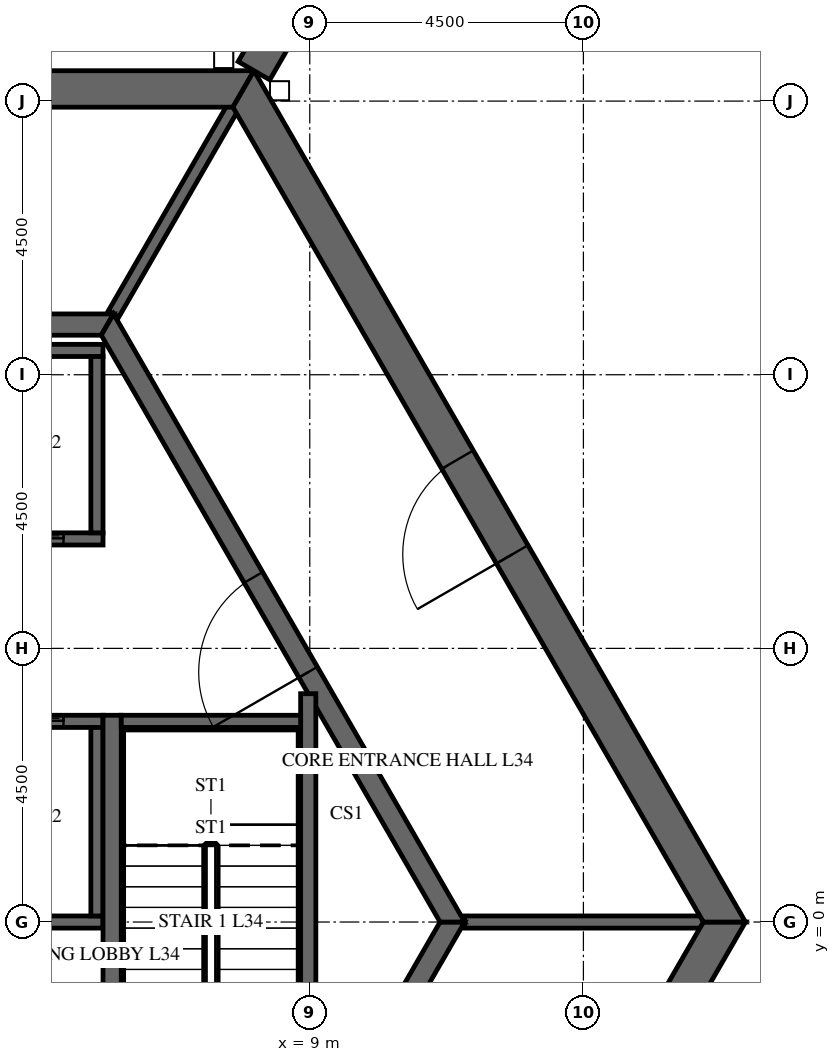
"""IFC4 building model, lengths in metres.
Left out: names, types, materials, properties, quantities, classifications, styles, units other than length and angle.
Written with IfcOpenShell. Run it as: python <this file> out.ifc"""

import sys

from ifc_helpers import new_model, si_unit, direction, frame, frame_2d, origin, place, context, subcontext, project, spatial, polyline, rectangle, outline, extrude, element, fill, save


model = new_model("IFC4")
c1 = context("Model", 3, precision=1e-05, world=origin(), true_north=direction((0.0, 1.0)))
c2 = subcontext(c1, "Body", "Model", "MODEL_VIEW")
j1 = project(units=[si_unit("LENGTHUNIT", "METRE"), si_unit("PLANEANGLEUNIT", "RADIAN")], contexts=[c1])
p1 = place(None, origin())
s1 = spatial("IfcSite", under=j1, at=p1, CompositionType="ELEMENT")
p2 = place(p1, origin())
s2 = spatial("IfcBuilding", under=s1, at=p2, CompositionType="ELEMENT")
p3 = place(p2, frame((0.0, 0.0, 146.7)))
s3 = spatial("IfcBuildingStorey", under=s2, at=p3, CompositionType="ELEMENT", Elevation=146.7)
p4 = place(p3, frame((7.91, -13.7, -0.3), z_axis=(0.0, 0.0, 1.0), x_axis=(0.499999880136, 0.866025472988, 0.0)))
e1 = element("IfcWall", 1, at=p4, inside=s3, PredefinedType="SHEAR", context=c2, shape_type="SweptSolid", body=[
    extrude(outline(polyline([(-0.173, -0.3), (15.993, -0.3), (15.646, 0.3), (0.173, 0.3), (-0.173, -0.3)])), origin(), (0.0, 0.0, 1.0), 5.8),
])
p5 = place(p4, frame((7.039, 0.0, 0.3)))
e2 = element("IfcOpeningElement", 2, at=p5, cuts=e1, PredefinedType="OPENING", context=c2, shape_type="SweptSolid", body=[
    extrude(rectangle(XDim=1.8, YDim=2.4, at=frame_2d((0.9, 1.2))), frame((0.0, 0.31, 0.0), z_axis=(0.0, -1.0, 0.0), x_axis=(1.0, 0.0, 0.0)), (0.0, 0.0, 1.0), 0.62),
])
p6 = place(p3, frame((15.819, 0.0, -0.3), z_axis=(0.0, 0.0, 1.0), x_axis=(-0.499999880136, 0.866025472988, 0.0)))
e3 = element("IfcWall", 3, at=p6, inside=s3, PredefinedType="SHEAR", context=c2, shape_type="SweptSolid", body=[
    extrude(outline(polyline([(-0.173, -0.3), (15.993, -0.3), (15.646, 0.3), (0.173, 0.3), (-0.173, -0.3)])), origin(), (0.0, 0.0, 1.0), 5.8),
])
p7 = place(p6, frame((6.981, 0.0, 0.3)))
e4 = element("IfcOpeningElement", 4, at=p7, cuts=e3, PredefinedType="OPENING", context=c2, shape_type="SweptSolid", body=[
    extrude(rectangle(XDim=1.8, YDim=2.4, at=frame_2d((0.9, 1.2))), frame((0.0, 0.31, 0.0), z_axis=(0.0, -1.0, 0.0), x_axis=(1.0, 0.0, 0.0)), (0.0, 0.0, 1.0), 0.62),
])
p8 = place(p3, frame((7.91, 13.7, -0.3), z_axis=(0.0, 0.0, 1.0), x_axis=(-1.0, 0.0, 0.0)))
e5 = element("IfcWall", 5, at=p8, inside=s3, PredefinedType="SHEAR", context=c2, shape_type="SweptSolid", body=[
    extrude(outline(polyline([(-0.173, -0.3), (15.993, -0.3), (15.646, 0.3), (0.173, 0.3), (-0.173, -0.3)])), origin(), (0.0, 0.0, 1.0), 5.8),
])
p9 = place(p8, frame((7.31, 0.0, 0.3)))
e6 = element("IfcOpeningElement", 6, at=p9, cuts=e5, PredefinedType="OPENING", context=c2, shape_type="SweptSolid", body=[
    extrude(rectangle(XDim=1.2, YDim=2.4, at=frame_2d((0.6, 1.2))), frame((0.0, 0.31, 0.0), z_axis=(0.0, -1.0, 0.0), x_axis=(1.0, 0.0, 0.0)), (0.0, 0.0, 1.0), 0.62),
])
p10 = place(p3, frame((8.083, 14.0, -0.3), z_axis=(0.0, 0.0, 1.0), x_axis=(0.499997680643, 0.866026742862, 0.0)))
e7 = element("IfcWall", 7, at=p10, inside=s3, PredefinedType="SHEAR", context=c2, shape_type="SweptSolid", body=[
    extrude(rectangle(XDim=16.509, YDim=0.6, at=frame_2d((8.254, 0.0))), origin(), (0.0, 0.0, 1.0), 5.8),
])
p11 = place(p10, frame((7.354, 0.0, 0.3)))
e8 = element("IfcOpeningElement", 8, at=p11, cuts=e7, PredefinedType="OPENING", context=c2, shape_type="SweptSolid", body=[
    extrude(rectangle(XDim=1.8, YDim=2.4, at=frame_2d((0.9, 1.2))), frame((0.0, 0.31, 0.0), z_axis=(0.0, -1.0, 0.0), x_axis=(1.0, 0.0, 0.0)), (0.0, 0.0, 1.0), 0.62),
])
p12 = place(p3, frame((5.673, -9.825, -0.3), z_axis=(0.0, 0.0, 1.0), x_axis=(0.499995046907, 0.866028263435, 0.0)))
e9 = element("IfcWall", 9, at=p12, inside=s3, PredefinedType="SHEAR", context=c2, shape_type="SweptSolid", body=[
    extrude(outline(polyline([(-0.101, -0.175), (11.446, -0.175), (11.244, 0.175), (0.101, 0.175), (-0.101, -0.175)])), origin(), (0.0, 0.0, 1.0), 5.8),
])
p13 = place(p12, frame((4.801, 0.0, 0.3)))
e10 = element("IfcOpeningElement", 10, at=p13, cuts=e9, PredefinedType="OPENING", context=c2, shape_type="SweptSolid", body=[
    extrude(rectangle(XDim=1.8, YDim=2.4, at=frame_2d((0.9, 1.2))), frame((0.0, 0.185, 0.0), z_axis=(0.0, -1.0, 0.0), x_axis=(1.0, 0.0, 0.0)), (0.0, 0.0, 1.0), 0.37),
])
p14 = place(p3, frame((11.345, 0.0, -0.3), z_axis=(0.0, 0.0, 1.0), x_axis=(-0.499995046907, 0.866028263435, 0.0)))
e11 = element("IfcWall", 11, at=p14, inside=s3, PredefinedType="SHEAR", context=c2, shape_type="SweptSolid", body=[
    extrude(outline(polyline([(-0.101, -0.175), (11.446, -0.175), (11.244, 0.175), (0.101, 0.175), (-0.101, -0.175)])), origin(), (0.0, 0.0, 1.0), 5.8),
])
p15 = place(p14, frame((4.744, 0.0, 0.3)))
e12 = element("IfcOpeningElement", 12, at=p15, cuts=e11, PredefinedType="OPENING", context=c2, shape_type="SweptSolid", body=[
    extrude(rectangle(XDim=1.8, YDim=2.4, at=frame_2d((0.9, 1.2))), frame((0.0, 0.185, 0.0), z_axis=(0.0, -1.0, 0.0), x_axis=(1.0, 0.0, 0.0)), (0.0, 0.0, 1.0), 0.37),
])
p16 = place(p3, frame((5.673, 9.825, -0.3), z_axis=(0.0, 0.0, 1.0), x_axis=(-1.0, 0.0, 0.0)))
e13 = element("IfcWall", 13, at=p16, inside=s3, PredefinedType="SHEAR", context=c2, shape_type="SweptSolid", body=[
    extrude(outline(polyline([(-0.101, -0.175), (11.446, -0.175), (11.244, 0.175), (0.101, 0.175), (-0.101, -0.175)])), origin(), (0.0, 0.0, 1.0), 5.8),
])
p17 = place(p3, frame((-5.6, 6.3, -0.25), z_axis=(0.0, 0.0, 1.0), x_axis=(1.0, 0.0, 0.0)))
e14 = element("IfcWall", 14, at=p17, inside=s3, PredefinedType="SHEAR", context=c2, shape_type="SweptSolid", body=[
    extrude(rectangle(XDim=11.2, YDim=0.2, at=frame_2d((5.6, 0.0))), origin(), (0.0, 0.0, 1.0), 5.75),
])
p18 = place(p17, frame((0.65, 0.0, 0.25)))
e15 = element("IfcOpeningElement", 15, at=p18, cuts=e14, PredefinedType="OPENING", context=c2, shape_type="SweptSolid", body=[
    extrude(rectangle(XDim=1.1, YDim=2.1, at=frame_2d((0.55, 1.05))), frame((0.0, 0.11, 0.0), z_axis=(0.0, -1.0, 0.0), x_axis=(1.0, 0.0, 0.0)), (0.0, 0.0, 1.0), 0.22),
])
p19 = place(p17, frame((2.85, 0.0, 0.25)))
e16 = element("IfcOpeningElement", 16, at=p19, cuts=e14, PredefinedType="OPENING", context=c2, shape_type="SweptSolid", body=[
    extrude(rectangle(XDim=1.1, YDim=2.1, at=frame_2d((0.55, 1.05))), frame((0.0, 0.11, 0.0), z_axis=(0.0, -1.0, 0.0), x_axis=(1.0, 0.0, 0.0)), (0.0, 0.0, 1.0), 0.22),
])
p20 = place(p17, frame((5.05, 0.0, 0.25)))
e17 = element("IfcOpeningElement", 17, at=p20, cuts=e14, PredefinedType="OPENING", context=c2, shape_type="SweptSolid", body=[
    extrude(rectangle(XDim=1.1, YDim=2.1, at=frame_2d((0.55, 1.05))), frame((0.0, 0.11, 0.0), z_axis=(0.0, -1.0, 0.0), x_axis=(1.0, 0.0, 0.0)), (0.0, 0.0, 1.0), 0.22),
])
p21 = place(p17, frame((7.25, 0.0, 0.25)))
e18 = element("IfcOpeningElement", 18, at=p21, cuts=e14, PredefinedType="OPENING", context=c2, shape_type="SweptSolid", body=[
    extrude(rectangle(XDim=1.1, YDim=2.1, at=frame_2d((0.55, 1.05))), frame((0.0, 0.11, 0.0), z_axis=(0.0, -1.0, 0.0), x_axis=(1.0, 0.0, 0.0)), (0.0, 0.0, 1.0), 0.22),
])
p22 = place(p17, frame((9.45, 0.0, 0.25)))
e19 = element("IfcOpeningElement", 19, at=p22, cuts=e14, PredefinedType="OPENING", context=c2, shape_type="SweptSolid", body=[
    extrude(rectangle(XDim=1.1, YDim=2.1, at=frame_2d((0.55, 1.05))), frame((0.0, 0.11, 0.0), z_axis=(0.0, -1.0, 0.0), x_axis=(1.0, 0.0, 0.0)), (0.0, 0.0, 1.0), 0.22),
])
p23 = place(p3, frame((-5.6, 9.4, -0.25), z_axis=(0.0, 0.0, 1.0), x_axis=(1.0, 0.0, 0.0)))
e20 = element("IfcWall", 20, at=p23, inside=s3, PredefinedType="SHEAR", context=c2, shape_type="SweptSolid", body=[
    extrude(rectangle(XDim=11.2, YDim=0.2, at=frame_2d((5.6, 0.0))), origin(), (0.0, 0.0, 1.0), 5.75),
])
p24 = place(p3, frame((5.5, 6.4, -0.25), z_axis=(0.0, 0.0, 1.0), x_axis=(0.0, 1.0, 0.0)))
e21 = element("IfcWall", 21, at=p24, inside=s3, PredefinedType="SHEAR", context=c2, shape_type="SweptSolid", body=[
    extrude(rectangle(XDim=2.9, YDim=0.2, at=frame_2d((1.45, 0.0))), origin(), (0.0, 0.0, 1.0), 5.75),
])
p25 = place(p3, frame((-5.6, 3.3, -0.25), z_axis=(0.0, 0.0, 1.0), x_axis=(1.0, 0.0, 0.0)))
e22 = element("IfcWall", 22, at=p25, inside=s3, PredefinedType="SHEAR", context=c2, shape_type="SweptSolid", body=[
    extrude(rectangle(XDim=11.2, YDim=0.2, at=frame_2d((5.6, 0.0))), origin(), (0.0, 0.0, 1.0), 5.75),
])
p26 = place(p25, frame((0.65, 0.0, 0.25)))
e23 = element("IfcOpeningElement", 23, at=p26, cuts=e22, PredefinedType="OPENING", context=c2, shape_type="SweptSolid", body=[
    extrude(rectangle(XDim=1.1, YDim=2.1, at=frame_2d((0.55, 1.05))), frame((0.0, 0.11, 0.0), z_axis=(0.0, -1.0, 0.0), x_axis=(1.0, 0.0, 0.0)), (0.0, 0.0, 1.0), 0.22),
])
p27 = place(p25, frame((2.85, 0.0, 0.25)))
e24 = element("IfcOpeningElement", 24, at=p27, cuts=e22, PredefinedType="OPENING", context=c2, shape_type="SweptSolid", body=[
    extrude(rectangle(XDim=1.1, YDim=2.1, at=frame_2d((0.55, 1.05))), frame((0.0, 0.11, 0.0), z_axis=(0.0, -1.0, 0.0), x_axis=(1.0, 0.0, 0.0)), (0.0, 0.0, 1.0), 0.22),
])
p28 = place(p25, frame((5.05, 0.0, 0.25)))
e25 = element("IfcOpeningElement", 25, at=p28, cuts=e22, PredefinedType="OPENING", context=c2, shape_type="SweptSolid", body=[
    extrude(rectangle(XDim=1.1, YDim=2.1, at=frame_2d((0.55, 1.05))), frame((0.0, 0.11, 0.0), z_axis=(0.0, -1.0, 0.0), x_axis=(1.0, 0.0, 0.0)), (0.0, 0.0, 1.0), 0.22),
])
p29 = place(p25, frame((7.25, 0.0, 0.25)))
e26 = element("IfcOpeningElement", 26, at=p29, cuts=e22, PredefinedType="OPENING", context=c2, shape_type="SweptSolid", body=[
    extrude(rectangle(XDim=1.1, YDim=2.1, at=frame_2d((0.55, 1.05))), frame((0.0, 0.11, 0.0), z_axis=(0.0, -1.0, 0.0), x_axis=(1.0, 0.0, 0.0)), (0.0, 0.0, 1.0), 0.22),
])
p30 = place(p25, frame((9.45, 0.0, 0.25)))
e27 = element("IfcOpeningElement", 27, at=p30, cuts=e22, PredefinedType="OPENING", context=c2, shape_type="SweptSolid", body=[
    extrude(rectangle(XDim=1.1, YDim=2.1, at=frame_2d((0.55, 1.05))), frame((0.0, 0.11, 0.0), z_axis=(0.0, -1.0, 0.0), x_axis=(1.0, 0.0, 0.0)), (0.0, 0.0, 1.0), 0.22),
])
p31 = place(p3, frame((-5.6, 0.0, -0.25), z_axis=(0.0, 0.0, 1.0), x_axis=(1.0, 0.0, 0.0)))
e28 = element("IfcWall", 28, at=p31, inside=s3, PredefinedType="SHEAR", context=c2, shape_type="SweptSolid", body=[
    extrude(rectangle(XDim=11.2, YDim=0.2, at=frame_2d((5.6, 0.0))), origin(), (0.0, 0.0, 1.0), 5.75),
])
p32 = place(p3, frame((5.5, 0.1, -0.25), z_axis=(0.0, 0.0, 1.0), x_axis=(0.0, 1.0, 0.0)))
e29 = element("IfcWall", 29, at=p32, inside=s3, PredefinedType="SHEAR", context=c2, shape_type="SweptSolid", body=[
    extrude(rectangle(XDim=3.1, YDim=0.2, at=frame_2d((1.55, 0.0))), origin(), (0.0, 0.0, 1.0), 5.75),
])
p33 = place(p3, frame((11.547, 0.0, -0.3), z_axis=(0.0, 0.0, 1.0), x_axis=(1.0, 0.0, 0.0)))
e30 = element("IfcWall", 30, at=p33, inside=s3, PredefinedType="SHEAR", context=c2, shape_type="SweptSolid", body=[
    extrude(rectangle(XDim=3.926, YDim=0.2, at=frame_2d((1.963, 0.0))), origin(), (0.0, 0.0, 1.0), 5.8),
])
p34 = place(p3, frame((5.773, 10.0, -0.3), z_axis=(0.0, 0.0, 1.0), x_axis=(0.500038251005, 0.86600331843, 0.0)))
e31 = element("IfcWall", 31, at=p34, inside=s3, PredefinedType="SHEAR", context=c2, shape_type="SweptSolid", body=[
    extrude(rectangle(XDim=3.926, YDim=0.2, at=frame_2d((1.963, 0.0))), origin(), (0.0, 0.0, 1.0), 5.8),
])
p35 = place(p3, frame((5.75, -3.4, -0.25), z_axis=(0.0, 0.0, 1.0), x_axis=(0.0, 1.0, 0.0)))
e32 = element("IfcWall", 32, at=p35, inside=s3, PredefinedType="SHEAR", context=c2, shape_type="SweptSolid", body=[
    extrude(rectangle(XDim=6.8, YDim=0.3, at=frame_2d((3.4, 0.0))), origin(), (0.0, 0.0, 1.0), 5.75),
])
p36 = place(p3, frame((8.975, -3.755, -0.25), z_axis=(0.0, 0.0, 1.0), x_axis=(0.0, 1.0, 0.0)))
e33 = element("IfcWall", 33, at=p36, inside=s3, PredefinedType="SHEAR", context=c2, shape_type="SweptSolid", body=[
    extrude(rectangle(XDim=7.51, YDim=0.25, at=frame_2d((3.755, 0.0))), origin(), (0.0, 0.0, 1.0), 5.75),
])
p37 = place(p3, frame((5.9, 3.3, -0.25), z_axis=(0.0, 0.0, 1.0), x_axis=(1.0, 0.0, 0.0)))
e34 = element("IfcWall", 34, at=p37, inside=s3, PredefinedType="SHEAR", context=c2, shape_type="SweptSolid", body=[
    extrude(rectangle(XDim=2.95, YDim=0.2, at=frame_2d((1.475, 0.0))), origin(), (0.0, 0.0, 1.0), 5.75),
])
p38 = place(p3, frame((26.523, 0.1, 0.0), z_axis=(0.0, 0.0, 1.0), x_axis=(-0.499985419657, 0.866033821586, 0.0)))
e35 = element("IfcWall", 35, at=p38, inside=s3, PredefinedType="PARTITIONING", context=c2, shape_type="SweptSolid", body=[
    extrude(rectangle(XDim=26.119, YDim=0.2, at=frame_2d((13.06, 0.0))), origin(), (0.0, 0.0, 1.0), 4.573),
])
p39 = place(p38, frame((12.459, 0.0, 0.0)))
e36 = element("IfcOpeningElement", 36, at=p39, cuts=e35, PredefinedType="OPENING", context=c2, shape_type="SweptSolid", body=[
    extrude(rectangle(XDim=1.2, YDim=2.1, at=frame_2d((0.6, 1.05))), frame((0.0, 0.11, 0.0), z_axis=(0.0, -1.0, 0.0), x_axis=(1.0, 0.0, 0.0)), (0.0, 0.0, 1.0), 0.22),
])
p40 = place(p7, origin())
e37 = element("IfcDoor", 37, at=p40, inside=s3, OperationType="DOUBLE_DOOR_SINGLE_SWING", PredefinedType="DOOR", context=c2, shape_type="SweptSolid", body=[
    extrude(rectangle(XDim=1.8, YDim=2.4, at=frame_2d((0.9, 1.2))), frame((0.0, 0.025, 0.0), z_axis=(0.0, -1.0, 0.0), x_axis=(1.0, 0.0, 0.0)), (0.0, 0.0, 1.0), 0.05),
])
fill(e4, e37)
p41 = place(p15, origin())
e38 = element("IfcDoor", 38, at=p41, inside=s3, OperationType="DOUBLE_DOOR_SINGLE_SWING", PredefinedType="DOOR", context=c2, shape_type="SweptSolid", body=[
    extrude(rectangle(XDim=1.8, YDim=2.4, at=frame_2d((0.9, 1.2))), frame((0.0, 0.025, 0.0), z_axis=(0.0, -1.0, 0.0), x_axis=(1.0, 0.0, 0.0)), (0.0, 0.0, 1.0), 0.05),
])
fill(e12, e38)
p42 = place(p22, origin())
e39 = element("IfcDoor", 39, at=p42, inside=s3, OperationType="SLIDING_TO_LEFT", PredefinedType="DOOR", context=c2, shape_type="SweptSolid", body=[
    extrude(rectangle(XDim=1.1, YDim=2.1, at=frame_2d((0.55, 1.05))), frame((0.0, 0.025, 0.0), z_axis=(0.0, -1.0, 0.0), x_axis=(1.0, 0.0, 0.0)), (0.0, 0.0, 1.0), 0.05),
])
fill(e19, e39)
p43 = place(p30, origin())
e40 = element("IfcDoor", 40, at=p43, inside=s3, OperationType="SLIDING_TO_LEFT", PredefinedType="DOOR", context=c2, shape_type="SweptSolid", body=[
    extrude(rectangle(XDim=1.1, YDim=2.1, at=frame_2d((0.55, 1.05))), frame((0.0, 0.025, 0.0), z_axis=(0.0, -1.0, 0.0), x_axis=(1.0, 0.0, 0.0)), (0.0, 0.0, 1.0), 0.05),
])
fill(e27, e40)
save(model, sys.argv[1])
